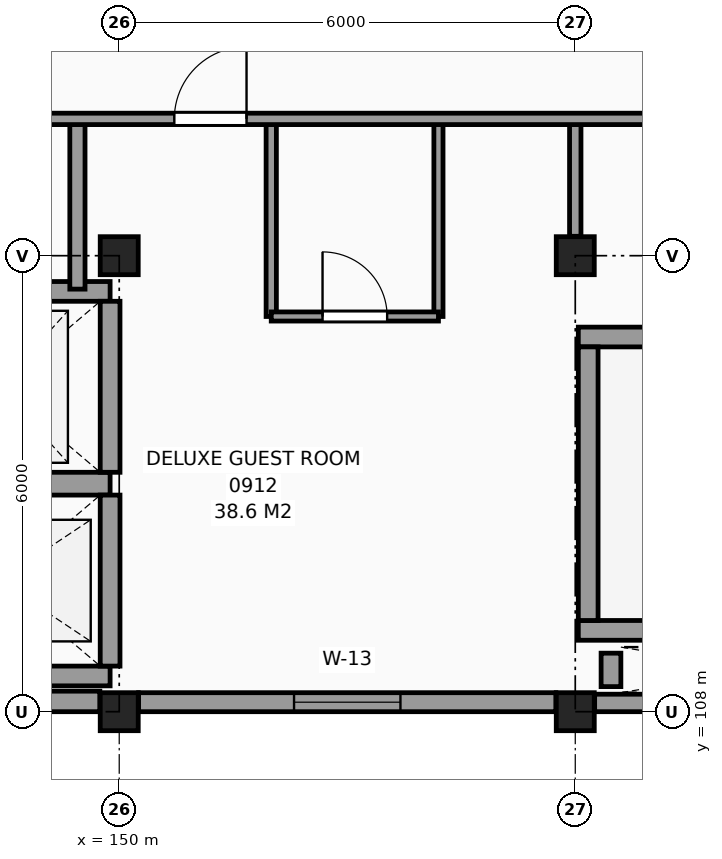
"""IFC4 building model, lengths in metres.
Left out: names, types, materials, properties, quantities, classifications, styles, units other than length and angle.
Written with IfcOpenShell. Run it as: python <this file> out.ifc"""

import sys

from ifc_helpers import new_model, si_unit, direction, frame, frame_2d, origin, origin_2d, place, context, subcontext, project, spatial, rectangle, extrude, element, fill, save


model = new_model("IFC4")
c1 = context("Model", 3, precision=1e-05, world=origin(), true_north=direction((0.0, 1.0)))
c2 = subcontext(c1, "Body", "Model", "MODEL_VIEW")
j1 = project(units=[si_unit("LENGTHUNIT", "METRE"), si_unit("PLANEANGLEUNIT", "RADIAN")], contexts=[c1])
p1 = place(None, origin())
s1 = spatial("IfcSite", under=j1, at=p1, CompositionType="ELEMENT")
p2 = place(p1, origin())
s2 = spatial("IfcBuilding", under=s1, at=p2, CompositionType="ELEMENT")
p3 = place(p2, frame((0.0, 0.0, 38.1)))
s3 = spatial("IfcBuildingStorey", under=s2, at=p3, CompositionType="ELEMENT", Elevation=38.1)
for number, where, z_axis, x_axis in (
    (1, (150.0, 108.0, 0.0), (0.0, 0.0, 1.0), (1.0, 0.0, 0.0)),
    (2, (150.0, 114.0, 0.0), (0.0, 0.0, 1.0), (1.0, 0.0, 0.0)),
    (3, (156.0, 108.0, 0.0), (0.0, 0.0, 1.0), (1.0, 0.0, 0.0)),
    (4, (156.0, 114.0, 0.0), (0.0, 0.0, 1.0), (1.0, 0.0, 0.0)),
):
    element("IfcColumn", number, at=place(p3, frame(where, z_axis=z_axis, x_axis=x_axis)), inside=s3, PredefinedType="COLUMN", context=c2, shape_type="SweptSolid", body=[
        extrude(rectangle(XDim=0.5, YDim=0.5, at=origin_2d()), origin(), (0.0, 0.0, 1.0), 3.3),
    ])
p4 = place(p3, frame((144.255, 108.135, 0.0), z_axis=(0.0, 0.0, 1.0), x_axis=(1.0, 0.0, 0.0)))
e5 = element("IfcWall", 5, at=p4, inside=s3, PredefinedType="SOLIDWALL", context=c2, shape_type="SweptSolid", body=[
    extrude(rectangle(XDim=5.49, YDim=0.27, at=frame_2d((2.745, 0.0))), origin(), (0.0, 0.0, 1.0), 2.41),
])
p5 = place(p3, frame((150.255, 108.125, 0.0), z_axis=(0.0, 0.0, 1.0), x_axis=(1.0, 0.0, 0.0)))
e6 = element("IfcWall", 6, at=p5, inside=s3, PredefinedType="SOLIDWALL", context=c2, shape_type="SweptSolid", body=[
    extrude(rectangle(XDim=5.49, YDim=0.25, at=frame_2d((2.745, 0.0))), origin(), (0.0, 0.0, 1.0), 2.41),
])
p6 = place(p5, frame((2.045, 0.0, 0.8)))
e7 = element("IfcOpeningElement", 7, at=p6, cuts=e6, PredefinedType="OPENING", context=c2, shape_type="SweptSolid", body=[
    extrude(rectangle(XDim=1.4, YDim=1.4, at=frame_2d((0.7, 0.7))), frame((0.0, 0.135, 0.0), z_axis=(0.0, -1.0, 0.0), x_axis=(1.0, 0.0, 0.0)), (0.0, 0.0, 1.0), 0.27),
])
p7 = place(p3, frame((156.255, 108.115, 0.0), z_axis=(0.0, 0.0, 1.0), x_axis=(1.0, 0.0, 0.0)))
e8 = element("IfcWall", 8, at=p7, inside=s3, PredefinedType="SOLIDWALL", context=c2, shape_type="SweptSolid", body=[
    extrude(rectangle(XDim=5.49, YDim=0.23, at=frame_2d((2.745, 0.0))), origin(), (0.0, 0.0, 1.0), 3.06),
])
for number, where, z_axis, x_axis in (
    (9, (156.04, 109.07, 0.0), (0.0, 0.0, 1.0), (1.0, 0.0, 0.0)),
    (10, (156.04, 112.93, 0.0), (0.0, 0.0, 1.0), (1.0, 0.0, 0.0)),
):
    element("IfcWall", number, at=place(p3, frame(where, z_axis=z_axis, x_axis=x_axis)), inside=s3, PredefinedType="SHEAR", context=c2, shape_type="SweptSolid", body=[
        extrude(rectangle(XDim=10.72, YDim=0.26, at=frame_2d((5.36, 0.0))), origin(), (0.0, 0.0, 1.0), 3.3),
    ])
p8 = place(p3, frame((156.17, 109.2, 0.0), z_axis=(0.0, 0.0, 1.0), x_axis=(0.0, 1.0, 0.0)))
e11 = element("IfcWall", 11, at=p8, inside=s3, PredefinedType="SHEAR", context=c2, shape_type="SweptSolid", body=[
    extrude(rectangle(XDim=3.6, YDim=0.26, at=frame_2d((1.8, 0.0))), origin(), (0.0, 0.0, 1.0), 3.3),
])
p9 = place(p3, frame((156.47, 108.33, 0.0), z_axis=(0.0, 0.0, 1.0), x_axis=(0.0, 1.0, 0.0)))
e12 = element("IfcWall", 12, at=p9, inside=s3, PredefinedType="SHEAR", context=c2, shape_type="SweptSolid", body=[
    extrude(rectangle(XDim=0.44, YDim=0.26, at=frame_2d((0.22, 0.0))), origin(), (0.0, 0.0, 1.0), 3.3),
])
p10 = place(p3, frame((146.97, 108.47, 0.0), z_axis=(0.0, 0.0, 1.0), x_axis=(1.0, 0.0, 0.0)))
e13 = element("IfcWall", 13, at=p10, inside=s3, PredefinedType="SHEAR", context=c2, shape_type="SweptSolid", body=[
    extrude(rectangle(XDim=2.91, YDim=0.26, at=frame_2d((1.455, 0.0))), origin(), (0.0, 0.0, 1.0), 3.3),
])
p11 = place(p3, frame((146.97, 111.0, 0.0), z_axis=(0.0, 0.0, 1.0), x_axis=(1.0, 0.0, 0.0)))
e14 = element("IfcWall", 14, at=p11, inside=s3, PredefinedType="SHEAR", context=c2, shape_type="SweptSolid", body=[
    extrude(rectangle(XDim=2.91, YDim=0.3, at=frame_2d((1.455, 0.0))), origin(), (0.0, 0.0, 1.0), 3.3),
])
p12 = place(p3, frame((149.88, 108.6, 0.0), z_axis=(0.0, 0.0, 1.0), x_axis=(0.0, 1.0, 0.0)))
e15 = element("IfcWall", 15, at=p12, inside=s3, PredefinedType="SHEAR", context=c2, shape_type="SweptSolid", body=[
    extrude(rectangle(XDim=2.25, YDim=0.26, at=frame_2d((1.125, 0.0))), origin(), (0.0, 0.0, 1.0), 3.3),
])
p13 = place(p3, frame((146.97, 113.53, 0.0), z_axis=(0.0, 0.0, 1.0), x_axis=(1.0, 0.0, 0.0)))
e16 = element("IfcWall", 16, at=p13, inside=s3, PredefinedType="SHEAR", context=c2, shape_type="SweptSolid", body=[
    extrude(rectangle(XDim=2.91, YDim=0.26, at=frame_2d((1.455, 0.0))), origin(), (0.0, 0.0, 1.0), 3.3),
])
p14 = place(p3, frame((149.88, 111.15, 0.0), z_axis=(0.0, 0.0, 1.0), x_axis=(0.0, 1.0, 0.0)))
e17 = element("IfcWall", 17, at=p14, inside=s3, PredefinedType="SHEAR", context=c2, shape_type="SweptSolid", body=[
    extrude(rectangle(XDim=2.25, YDim=0.26, at=frame_2d((1.125, 0.0))), origin(), (0.0, 0.0, 1.0), 3.3),
])
p15 = place(p3, frame((149.45, 113.56, 0.0), z_axis=(0.0, 0.0, 1.0), x_axis=(0.0, 1.0, 0.0)))
e18 = element("IfcWall", 18, at=p15, inside=s3, PredefinedType="PARTITIONING", context=c2, shape_type="SweptSolid", body=[
    extrude(rectangle(XDim=2.24, YDim=0.2, at=frame_2d((1.12, 0.0))), origin(), (0.0, 0.0, 1.0), 3.06),
])
p16 = place(p3, frame((152.0, 113.2, 0.0), z_axis=(0.0, 0.0, 1.0), x_axis=(0.0, 1.0, 0.0)))
e19 = element("IfcWall", 19, at=p16, inside=s3, PredefinedType="PARTITIONING", context=c2, shape_type="SweptSolid", body=[
    extrude(rectangle(XDim=2.6, YDim=0.135, at=frame_2d((1.3, 0.0))), origin(), (0.0, 0.0, 1.0), 3.06),
])
p17 = place(p3, frame((154.2, 113.2, 0.0), z_axis=(0.0, 0.0, 1.0), x_axis=(0.0, 1.0, 0.0)))
e20 = element("IfcWall", 20, at=p17, inside=s3, PredefinedType="PARTITIONING", context=c2, shape_type="SweptSolid", body=[
    extrude(rectangle(XDim=2.6, YDim=0.12, at=frame_2d((1.3, 0.0))), origin(), (0.0, 0.0, 1.0), 3.06),
])
p18 = place(p3, frame((156.0, 114.255, 0.0), z_axis=(0.0, 0.0, 1.0), x_axis=(0.0, 1.0, 0.0)))
e21 = element("IfcWall", 21, at=p18, inside=s3, PredefinedType="PARTITIONING", context=c2, shape_type="SweptSolid", body=[
    extrude(rectangle(XDim=1.545, YDim=0.15, at=frame_2d((0.772, 0.0))), origin(), (0.0, 0.0, 1.0), 2.72),
])
p19 = place(p3, frame((152.0, 113.2, 0.0), z_axis=(0.0, 0.0, 1.0), x_axis=(1.0, 0.0, 0.0)))
e22 = element("IfcWall", 22, at=p19, inside=s3, PredefinedType="PARTITIONING", context=c2, shape_type="SweptSolid", body=[
    extrude(rectangle(XDim=2.2, YDim=0.12, at=frame_2d((1.1, 0.0))), origin(), (0.0, 0.0, 1.0), 3.06),
])
p20 = place(p19, frame((0.675, 0.0, 0.0)))
e23 = element("IfcOpeningElement", 23, at=p20, cuts=e22, PredefinedType="OPENING", context=c2, shape_type="SweptSolid", body=[
    extrude(rectangle(XDim=0.85, YDim=2.1, at=frame_2d((0.425, 1.05))), frame((0.0, 0.07, 0.0), z_axis=(0.0, -1.0, 0.0), x_axis=(1.0, 0.0, 0.0)), (0.0, 0.0, 1.0), 0.14),
])
p21 = place(p3, frame((102.215, 115.8, 0.0), z_axis=(0.0, 0.0, 1.0), x_axis=(1.0, 0.0, 0.0)))
e24 = element("IfcWall", 24, at=p21, inside=s3, PredefinedType="PARTITIONING", context=c2, shape_type="SweptSolid", body=[
    extrude(rectangle(XDim=67.585, YDim=0.15, at=frame_2d((33.792, 0.0))), origin(), (0.0, 0.0, 1.0), 3.06),
])
p22 = place(p21, frame((44.185, 0.0, 0.0)))
e25 = element("IfcOpeningElement", 25, at=p22, cuts=e24, PredefinedType="OPENING", context=c2, shape_type="SweptSolid", body=[
    extrude(rectangle(XDim=1.2, YDim=2.2, at=frame_2d((0.6, 1.1))), frame((0.0, 0.085, 0.0), z_axis=(0.0, -1.0, 0.0), x_axis=(1.0, 0.0, 0.0)), (0.0, 0.0, 1.0), 0.17),
])
p23 = place(p21, frame((14.185, 0.0, 0.0)))
e26 = element("IfcOpeningElement", 26, at=p23, cuts=e24, PredefinedType="OPENING", context=c2, shape_type="SweptSolid", body=[
    extrude(rectangle(XDim=1.2, YDim=2.2, at=frame_2d((0.6, 1.1))), frame((0.0, 0.085, 0.0), z_axis=(0.0, -1.0, 0.0), x_axis=(1.0, 0.0, 0.0)), (0.0, 0.0, 1.0), 0.17),
])
p24 = place(p21, frame((19.335, 0.0, 0.0)))
e27 = element("IfcOpeningElement", 27, at=p24, cuts=e24, PredefinedType="OPENING", context=c2, shape_type="SweptSolid", body=[
    extrude(rectangle(XDim=1.0, YDim=2.15, at=frame_2d((0.5, 1.075))), frame((0.0, 0.085, 0.0), z_axis=(0.0, -1.0, 0.0), x_axis=(1.0, 0.0, 0.0)), (0.0, 0.0, 1.0), 0.17),
])
p25 = place(p21, frame((26.305, 0.0, 0.0)))
e28 = element("IfcOpeningElement", 28, at=p25, cuts=e24, PredefinedType="OPENING", context=c2, shape_type="SweptSolid", body=[
    extrude(rectangle(XDim=0.96, YDim=2.15, at=frame_2d((0.48, 1.075))), frame((0.0, 0.085, 0.0), z_axis=(0.0, -1.0, 0.0), x_axis=(1.0, 0.0, 0.0)), (0.0, 0.0, 1.0), 0.17),
])
p26 = place(p21, frame((48.51, 0.0, 0.0)))
e29 = element("IfcOpeningElement", 29, at=p26, cuts=e24, PredefinedType="OPENING", context=c2, shape_type="SweptSolid", body=[
    extrude(rectangle(XDim=0.95, YDim=2.1, at=frame_2d((0.475, 1.05))), frame((0.0, 0.085, 0.0), z_axis=(0.0, -1.0, 0.0), x_axis=(1.0, 0.0, 0.0)), (0.0, 0.0, 1.0), 0.17),
])
p27 = place(p6, origin())
e30 = element("IfcWindow", 30, at=p27, inside=s3, PartitioningType="SINGLE_PANEL", PredefinedType="WINDOW", context=c2, shape_type="SweptSolid", body=[
    extrude(rectangle(XDim=1.4, YDim=1.4, at=frame_2d((0.7, 0.7))), frame((0.0, 0.03, 0.0), z_axis=(0.0, -1.0, 0.0), x_axis=(1.0, 0.0, 0.0)), (0.0, 0.0, 1.0), 0.06),
])
fill(e7, e30)
p28 = place(p20, origin())
e31 = element("IfcDoor", 31, at=p28, inside=s3, OperationType="SINGLE_SWING_LEFT", PredefinedType="DOOR", context=c2, shape_type="SweptSolid", body=[
    extrude(rectangle(XDim=0.85, YDim=2.1, at=frame_2d((0.425, 1.05))), frame((0.0, 0.025, 0.0), z_axis=(0.0, -1.0, 0.0), x_axis=(1.0, 0.0, 0.0)), (0.0, 0.0, 1.0), 0.05),
])
fill(e23, e31)
p29 = place(p26, origin())
e32 = element("IfcDoor", 32, at=p29, inside=s3, OperationType="SINGLE_SWING_RIGHT", PredefinedType="DOOR", context=c2, shape_type="SweptSolid", body=[
    extrude(rectangle(XDim=0.95, YDim=2.1, at=frame_2d((0.475, 1.05))), frame((0.0, 0.025, 0.0), z_axis=(0.0, -1.0, 0.0), x_axis=(1.0, 0.0, 0.0)), (0.0, 0.0, 1.0), 0.05),
])
fill(e29, e32)
save(model, sys.argv[1])
